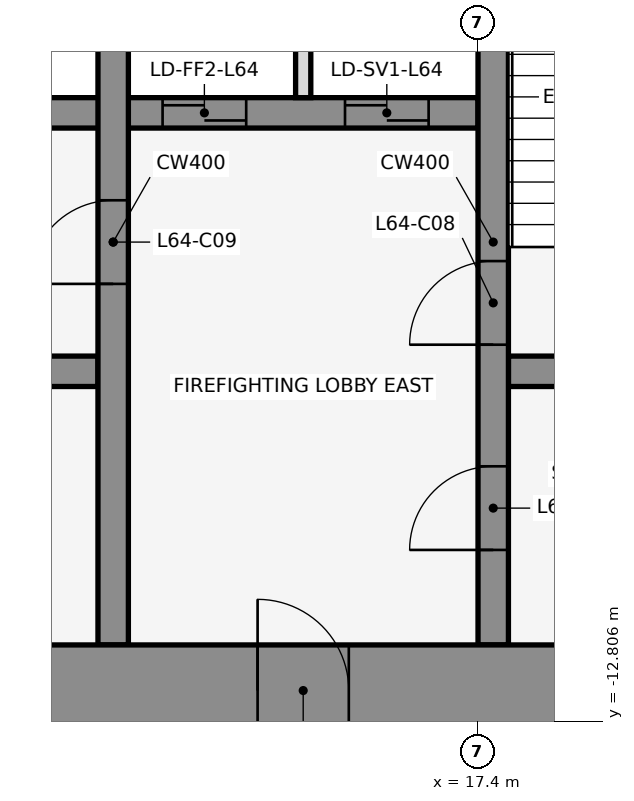
"""IFC4 building model, lengths in metres.
Left out: names, types, materials, properties, quantities, classifications, styles, units other than length and angle.
Written with IfcOpenShell. Run it as: python <this file> out.ifc"""

import sys

from ifc_helpers import new_model, si_unit, direction, frame, frame_2d, origin, place, context, subcontext, project, spatial, rectangle, extrude, element, fill, save


model = new_model("IFC4")
c1 = context("Model", 3, precision=1e-05, world=origin(), true_north=direction((0.0, 1.0)))
c2 = subcontext(c1, "Body", "Model", "MODEL_VIEW")
j1 = project(units=[si_unit("LENGTHUNIT", "METRE"), si_unit("PLANEANGLEUNIT", "RADIAN")], contexts=[c1])
p1 = place(None, origin())
s1 = spatial("IfcSite", under=j1, at=p1, CompositionType="ELEMENT")
p2 = place(p1, origin())
s2 = spatial("IfcBuilding", under=s1, at=p2, CompositionType="ELEMENT")
p3 = place(p2, frame((0.0, 0.0, 283.4)))
s3 = spatial("IfcBuildingStorey", under=s2, at=p3, CompositionType="ELEMENT", Elevation=283.4)
p4 = place(p3, frame((6.4, -8.2, 0.0), z_axis=(0.0, 0.0, 1.0), x_axis=(1.0, 0.0, 0.0)))
e1 = element("IfcWall", 1, at=p4, inside=s3, PredefinedType="SHEAR", context=c2, shape_type="SweptSolid", body=[
    extrude(rectangle(XDim=6.0, YDim=0.4, at=frame_2d((3.0, 0.0))), origin(), (0.0, 0.0, 1.0), 4.2),
])
p5 = place(p4, frame((2.65, 0.0, 0.0)))
e2 = element("IfcOpeningElement", 2, at=p5, cuts=e1, PredefinedType="OPENING", context=c2, shape_type="SweptSolid", body=[
    extrude(rectangle(XDim=0.9, YDim=2.1, at=frame_2d((0.45, 1.05))), frame((0.0, 0.212, 0.0), z_axis=(0.0, -1.0, 0.0), x_axis=(1.0, 0.0, 0.0)), (0.0, 0.0, 1.0), 0.424),
])
p6 = place(p3, frame((17.8, -8.2, 0.0), z_axis=(0.0, 0.0, 1.0), x_axis=(1.0, 0.0, 0.0)))
e3 = element("IfcWall", 3, at=p6, inside=s3, PredefinedType="SHEAR", context=c2, shape_type="SweptSolid", body=[
    extrude(rectangle(XDim=3.0, YDim=0.4, at=frame_2d((1.5, 0.0))), origin(), (0.0, 0.0, 1.0), 4.2),
])
p7 = place(p6, frame((0.85, 0.0, 0.0)))
e4 = element("IfcOpeningElement", 4, at=p7, cuts=e3, PredefinedType="OPENING", context=c2, shape_type="SweptSolid", body=[
    extrude(rectangle(XDim=1.2, YDim=2.1, at=frame_2d((0.6, 1.05))), frame((0.0, 0.212, 0.0), z_axis=(0.0, -1.0, 0.0), x_axis=(1.0, 0.0, 0.0)), (0.0, 0.0, 1.0), 0.424),
])
p8 = place(p3, frame((3.8, -4.8, 0.0), z_axis=(0.0, 0.0, 1.0), x_axis=(1.0, 0.0, 0.0)))
e5 = element("IfcWall", 5, at=p8, inside=s3, PredefinedType="SHEAR", context=c2, shape_type="SweptSolid", body=[
    extrude(rectangle(XDim=13.6, YDim=0.4, at=frame_2d((6.8, 0.0))), origin(), (0.0, 0.0, 1.0), 4.2),
])
p9 = place(p8, frame((0.75, 0.0, 0.0)))
e6 = element("IfcOpeningElement", 6, at=p9, cuts=e5, PredefinedType="OPENING", context=c2, shape_type="SweptSolid", body=[
    extrude(rectangle(XDim=1.2, YDim=2.1, at=frame_2d((0.6, 1.05))), frame((0.0, 0.212, 0.0), z_axis=(0.0, -1.0, 0.0), x_axis=(1.0, 0.0, 0.0)), (0.0, 0.0, 1.0), 0.424),
])
p10 = place(p8, frame((3.65, 0.0, 0.0)))
e7 = element("IfcOpeningElement", 7, at=p10, cuts=e5, PredefinedType="OPENING", context=c2, shape_type="SweptSolid", body=[
    extrude(rectangle(XDim=1.2, YDim=2.1, at=frame_2d((0.6, 1.05))), frame((0.0, 0.212, 0.0), z_axis=(0.0, -1.0, 0.0), x_axis=(1.0, 0.0, 0.0)), (0.0, 0.0, 1.0), 0.424),
])
p11 = place(p8, frame((6.65, 0.0, 0.0)))
e8 = element("IfcOpeningElement", 8, at=p11, cuts=e5, PredefinedType="OPENING", context=c2, shape_type="SweptSolid", body=[
    extrude(rectangle(XDim=1.2, YDim=2.1, at=frame_2d((0.6, 1.05))), frame((0.0, 0.212, 0.0), z_axis=(0.0, -1.0, 0.0), x_axis=(1.0, 0.0, 0.0)), (0.0, 0.0, 1.0), 0.424),
])
p12 = place(p8, frame((9.45, 0.0, 0.0)))
e9 = element("IfcOpeningElement", 9, at=p12, cuts=e5, PredefinedType="OPENING", context=c2, shape_type="SweptSolid", body=[
    extrude(rectangle(XDim=1.1, YDim=2.1, at=frame_2d((0.55, 1.05))), frame((0.0, 0.212, 0.0), z_axis=(0.0, -1.0, 0.0), x_axis=(1.0, 0.0, 0.0)), (0.0, 0.0, 1.0), 0.424),
])
p13 = place(p8, frame((11.85, 0.0, 0.0)))
e10 = element("IfcOpeningElement", 10, at=p13, cuts=e5, PredefinedType="OPENING", context=c2, shape_type="SweptSolid", body=[
    extrude(rectangle(XDim=1.1, YDim=2.1, at=frame_2d((0.55, 1.05))), frame((0.0, 0.212, 0.0), z_axis=(0.0, -1.0, 0.0), x_axis=(1.0, 0.0, 0.0)), (0.0, 0.0, 1.0), 0.424),
])
p14 = place(p3, frame((12.6, -11.8, 0.0), z_axis=(0.0, 0.0, 1.0), x_axis=(0.0, 1.0, 0.0)))
e11 = element("IfcWall", 11, at=p14, inside=s3, PredefinedType="SHEAR", context=c2, shape_type="SweptSolid", body=[
    extrude(rectangle(XDim=10.6, YDim=0.4, at=frame_2d((5.3, 0.0))), origin(), (0.0, 0.0, 1.0), 4.2),
])
p15 = place(p14, frame((4.75, 0.0, 0.0)))
e12 = element("IfcOpeningElement", 12, at=p15, cuts=e11, PredefinedType="OPENING", context=c2, shape_type="SweptSolid", body=[
    extrude(rectangle(XDim=1.1, YDim=2.1, at=frame_2d((0.55, 1.05))), frame((0.0, 0.212, 0.0), z_axis=(0.0, -1.0, 0.0), x_axis=(1.0, 0.0, 0.0)), (0.0, 0.0, 1.0), 0.424),
])
p16 = place(p3, frame((15.1, -4.6, 0.0), z_axis=(0.0, 0.0, 1.0), x_axis=(0.0, 1.0, 0.0)))
e13 = element("IfcWall", 13, at=p16, inside=s3, PredefinedType="PARTITIONING", context=c2, shape_type="SweptSolid", body=[
    extrude(rectangle(XDim=3.4, YDim=0.2, at=frame_2d((1.7, 0.0))), origin(), (0.0, 0.0, 1.0), 3.068),
])
p17 = place(p3, frame((17.6, -11.8, 0.0), z_axis=(0.0, 0.0, 1.0), x_axis=(0.0, 1.0, 0.0)))
e14 = element("IfcWall", 14, at=p17, inside=s3, PredefinedType="SHEAR", context=c2, shape_type="SweptSolid", body=[
    extrude(rectangle(XDim=10.6, YDim=0.4, at=frame_2d((5.3, 0.0))), origin(), (0.0, 0.0, 1.0), 4.2),
])
p18 = place(p17, frame((1.25, 0.0, 0.0)))
e15 = element("IfcOpeningElement", 15, at=p18, cuts=e14, PredefinedType="OPENING", context=c2, shape_type="SweptSolid", body=[
    extrude(rectangle(XDim=1.1, YDim=2.1, at=frame_2d((0.55, 1.05))), frame((0.0, 0.212, 0.0), z_axis=(0.0, -1.0, 0.0), x_axis=(1.0, 0.0, 0.0)), (0.0, 0.0, 1.0), 0.424),
])
p19 = place(p17, frame((3.95, 0.0, 0.0)))
e16 = element("IfcOpeningElement", 16, at=p19, cuts=e14, PredefinedType="OPENING", context=c2, shape_type="SweptSolid", body=[
    extrude(rectangle(XDim=1.1, YDim=2.1, at=frame_2d((0.55, 1.05))), frame((0.0, 0.212, 0.0), z_axis=(0.0, -1.0, 0.0), x_axis=(1.0, 0.0, 0.0)), (0.0, 0.0, 1.0), 0.424),
])
p20 = place(p3, frame((-22.0, -12.4, 0.0), z_axis=(0.0, 0.0, 1.0), x_axis=(1.0, 0.0, 0.0)))
e17 = element("IfcWall", 17, at=p20, inside=s3, PredefinedType="SHEAR", context=c2, shape_type="SweptSolid", body=[
    extrude(rectangle(XDim=44.0, YDim=1.2, at=frame_2d((22.0, 0.0))), origin(), (0.0, 0.0, 1.0), 4.2),
])
p21 = place(p20, frame((2.2, 0.0, 0.0)))
e18 = element("IfcOpeningElement", 18, at=p21, cuts=e17, PredefinedType="OPENING", context=c2, shape_type="SweptSolid", body=[
    extrude(rectangle(XDim=1.2, YDim=2.1, at=frame_2d((0.6, 1.05))), frame((0.0, 0.612, 0.0), z_axis=(0.0, -1.0, 0.0), x_axis=(1.0, 0.0, 0.0)), (0.0, 0.0, 1.0), 1.224),
])
p22 = place(p20, frame((21.4, 0.0, 0.0)))
e19 = element("IfcOpeningElement", 19, at=p22, cuts=e17, PredefinedType="OPENING", context=c2, shape_type="SweptSolid", body=[
    extrude(rectangle(XDim=1.2, YDim=2.1, at=frame_2d((0.6, 1.05))), frame((0.0, 0.612, 0.0), z_axis=(0.0, -1.0, 0.0), x_axis=(1.0, 0.0, 0.0)), (0.0, 0.0, 1.0), 1.224),
])
p23 = place(p20, frame((40.6, 0.0, 0.0)))
e20 = element("IfcOpeningElement", 20, at=p23, cuts=e17, PredefinedType="OPENING", context=c2, shape_type="SweptSolid", body=[
    extrude(rectangle(XDim=1.2, YDim=2.1, at=frame_2d((0.6, 1.05))), frame((0.0, 0.612, 0.0), z_axis=(0.0, -1.0, 0.0), x_axis=(1.0, 0.0, 0.0)), (0.0, 0.0, 1.0), 1.224),
])
p24 = place(p20, frame((16.0, 0.0, 0.0)))
e21 = element("IfcOpeningElement", 21, at=p24, cuts=e17, PredefinedType="OPENING", context=c2, shape_type="SweptSolid", body=[
    extrude(rectangle(XDim=1.8, YDim=2.1, at=frame_2d((0.9, 1.05))), frame((0.0, 0.612, 0.0), z_axis=(0.0, -1.0, 0.0), x_axis=(1.0, 0.0, 0.0)), (0.0, 0.0, 1.0), 1.224),
])
p25 = place(p20, frame((6.3, 0.0, 0.0)))
e22 = element("IfcOpeningElement", 22, at=p25, cuts=e17, PredefinedType="OPENING", context=c2, shape_type="SweptSolid", body=[
    extrude(rectangle(XDim=1.2, YDim=2.1, at=frame_2d((0.6, 1.05))), frame((0.0, 0.612, 0.0), z_axis=(0.0, -1.0, 0.0), x_axis=(1.0, 0.0, 0.0)), (0.0, 0.0, 1.0), 1.224),
])
p26 = place(p20, frame((26.2, 0.0, 0.0)))
e23 = element("IfcOpeningElement", 23, at=p26, cuts=e17, PredefinedType="OPENING", context=c2, shape_type="SweptSolid", body=[
    extrude(rectangle(XDim=1.8, YDim=2.1, at=frame_2d((0.9, 1.05))), frame((0.0, 0.612, 0.0), z_axis=(0.0, -1.0, 0.0), x_axis=(1.0, 0.0, 0.0)), (0.0, 0.0, 1.0), 1.224),
])
p27 = place(p20, frame((36.5, 0.0, 0.0)))
e24 = element("IfcOpeningElement", 24, at=p27, cuts=e17, PredefinedType="OPENING", context=c2, shape_type="SweptSolid", body=[
    extrude(rectangle(XDim=1.2, YDim=2.1, at=frame_2d((0.6, 1.05))), frame((0.0, 0.612, 0.0), z_axis=(0.0, -1.0, 0.0), x_axis=(1.0, 0.0, 0.0)), (0.0, 0.0, 1.0), 1.224),
])
p28 = place(p18, origin())
e25 = element("IfcDoor", 25, at=p28, inside=s3, OperationType="SINGLE_SWING_LEFT", PredefinedType="DOOR", context=c2, shape_type="SweptSolid", body=[
    extrude(rectangle(XDim=1.1, YDim=2.1, at=frame_2d((0.55, 1.05))), frame((0.0, 0.025, 0.0), z_axis=(0.0, -1.0, 0.0), x_axis=(1.0, 0.0, 0.0)), (0.0, 0.0, 1.0), 0.05),
])
fill(e15, e25)
p29 = place(p12, origin())
e26 = element("IfcDoor", 26, at=p29, inside=s3, OperationType="DOUBLE_DOOR_SLIDING", PredefinedType="DOOR", context=c2, shape_type="SweptSolid", body=[
    extrude(rectangle(XDim=1.1, YDim=2.1, at=frame_2d((0.55, 1.05))), frame((0.0, 0.025, 0.0), z_axis=(0.0, -1.0, 0.0), x_axis=(1.0, 0.0, 0.0)), (0.0, 0.0, 1.0), 0.05),
])
fill(e9, e26)
p30 = place(p13, origin())
e27 = element("IfcDoor", 27, at=p30, inside=s3, OperationType="DOUBLE_DOOR_SLIDING", PredefinedType="DOOR", context=c2, shape_type="SweptSolid", body=[
    extrude(rectangle(XDim=1.1, YDim=2.1, at=frame_2d((0.55, 1.05))), frame((0.0, 0.025, 0.0), z_axis=(0.0, -1.0, 0.0), x_axis=(1.0, 0.0, 0.0)), (0.0, 0.0, 1.0), 0.05),
])
fill(e10, e27)
p31 = place(p19, origin())
e28 = element("IfcDoor", 28, at=p31, inside=s3, OperationType="SINGLE_SWING_RIGHT", PredefinedType="DOOR", context=c2, shape_type="SweptSolid", body=[
    extrude(rectangle(XDim=1.1, YDim=2.1, at=frame_2d((0.55, 1.05))), frame((0.0, 0.025, 0.0), z_axis=(0.0, -1.0, 0.0), x_axis=(1.0, 0.0, 0.0)), (0.0, 0.0, 1.0), 0.05),
])
fill(e16, e28)
p32 = place(p15, frame((1.1, 0.0, 0.0), z_axis=(0.0, 0.0, 1.0), x_axis=(-1.0, 0.0, 0.0)))
e29 = element("IfcDoor", 29, at=p32, inside=s3, OperationType="SINGLE_SWING_RIGHT", PredefinedType="DOOR", context=c2, shape_type="SweptSolid", body=[
    extrude(rectangle(XDim=1.1, YDim=2.1, at=frame_2d((0.55, 1.05))), frame((0.0, 0.025, 0.0), z_axis=(0.0, -1.0, 0.0), x_axis=(1.0, 0.0, 0.0)), (0.0, 0.0, 1.0), 0.05),
])
fill(e12, e29)
p33 = place(p27, frame((1.2, 0.0, 0.0), z_axis=(0.0, 0.0, 1.0), x_axis=(-1.0, 0.0, 0.0)))
e30 = element("IfcDoor", 30, at=p33, inside=s3, OperationType="SINGLE_SWING_RIGHT", PredefinedType="DOOR", context=c2, shape_type="SweptSolid", body=[
    extrude(rectangle(XDim=1.2, YDim=2.1, at=frame_2d((0.6, 1.05))), frame((0.0, 0.025, 0.0), z_axis=(0.0, -1.0, 0.0), x_axis=(1.0, 0.0, 0.0)), (0.0, 0.0, 1.0), 0.05),
])
fill(e24, e30)
save(model, sys.argv[1])
